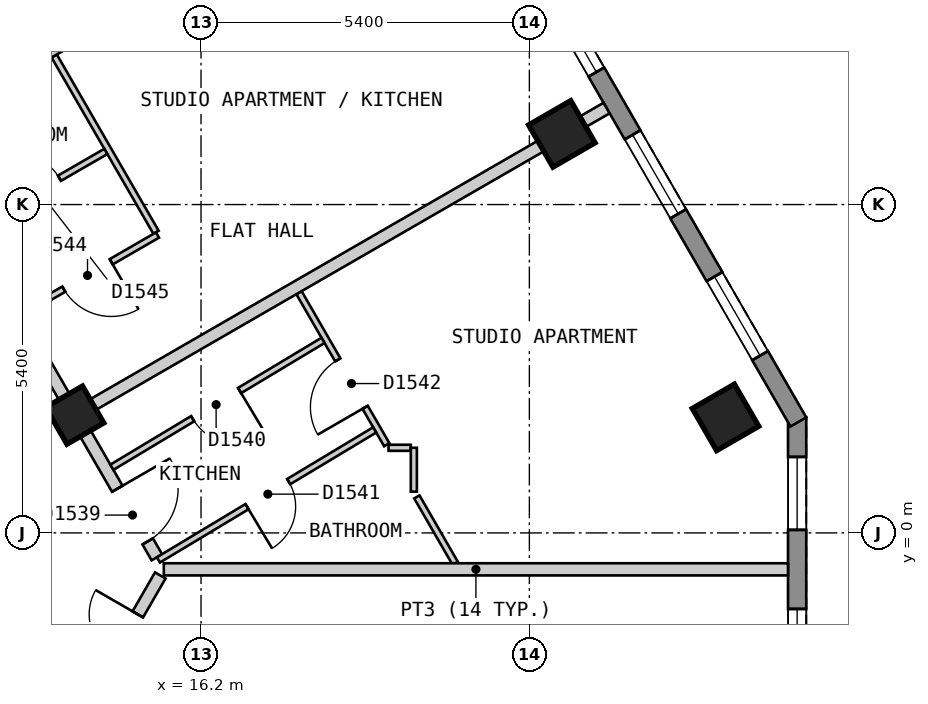
"""IFC4 building model, lengths in metres.
Left out: names, types, materials, properties, quantities, classifications, styles, units other than length and angle.
Written with IfcOpenShell. Run it as: python <this file> out.ifc"""

import sys

from ifc_helpers import new_model, si_unit, direction, frame, frame_2d, origin, origin_2d, place, context, subcontext, project, spatial, polyline, rectangle, outline, extrude, element, fill, save


model = new_model("IFC4")
c1 = context("Model", 3, precision=1e-05, world=origin(), true_north=direction((0.0, 1.0)))
c2 = subcontext(c1, "Body", "Model", "MODEL_VIEW")
j1 = project(units=[si_unit("LENGTHUNIT", "METRE"), si_unit("PLANEANGLEUNIT", "RADIAN")], contexts=[c1])
p1 = place(None, origin())
s1 = spatial("IfcSite", under=j1, at=p1, CompositionType="ELEMENT")
p2 = place(p1, origin())
s2 = spatial("IfcBuilding", under=s1, at=p2, CompositionType="ELEMENT")
p3 = place(p2, frame((0.0, 0.0, 184.2)))
s3 = spatial("IfcBuildingStorey", under=s2, at=p3, CompositionType="ELEMENT", Elevation=184.2)
for number, where, z_axis, x_axis in (
    (1, (24.826, 1.9, 0.0), (0.0, 0.0, 1.0), (-0.5, 0.866, 0.0)),
    (2, (22.134, 6.562, 0.0), (0.0, 0.0, 1.0), (-0.5, 0.866, 0.0)),
):
    element("IfcColumn", number, at=place(p3, frame(where, z_axis=z_axis, x_axis=x_axis)), inside=s3, PredefinedType="COLUMN", context=c2, shape_type="SweptSolid", body=[
        extrude(rectangle(XDim=0.8, YDim=0.8, at=origin_2d()), origin(), (0.0, 0.0, 1.0), 3.0),
    ])
p4 = place(p3, frame((14.123, 1.937, 0.0), z_axis=(0.0, 0.0, 1.0), x_axis=(-0.5, 0.866025403784, 0.0)))
e3 = element("IfcColumn", 3, at=p4, inside=s3, PredefinedType="COLUMN", context=c2, shape_type="SweptSolid", body=[
    extrude(rectangle(XDim=0.7, YDim=0.7, at=origin_2d()), origin(), (0.0, 0.0, 1.0), 3.0),
])
p5 = place(p3, frame((26.004, -3.1, 0.0), z_axis=(0.0, 0.0, 1.0), x_axis=(0.0, 1.0, 0.0)))
e4 = element("IfcWall", 4, at=p5, inside=s3, PredefinedType="SOLIDWALL", context=c2, shape_type="SweptSolid", body=[
    extrude(outline(polyline([(0.0, -0.15), (5.0, -0.15), (4.92, 0.15), (0.08, 0.15), (0.0, -0.15)])), origin(), (0.0, 0.0, 1.0), 2.7),
])
p6 = place(p5, frame((0.65, 0.0, 0.15)))
e5 = element("IfcOpeningElement", 5, at=p6, cuts=e4, PredefinedType="OPENING", context=c2, shape_type="SweptSolid", body=[
    extrude(rectangle(XDim=1.2, YDim=2.1, at=frame_2d((0.6, 1.05))), frame((0.0, 0.16, 0.0), z_axis=(0.0, -1.0, 0.0), x_axis=(1.0, 0.0, 0.0)), (0.0, 0.0, 1.0), 0.32),
])
p7 = place(p5, frame((3.15, 0.0, 0.15)))
e6 = element("IfcOpeningElement", 6, at=p7, cuts=e4, PredefinedType="OPENING", context=c2, shape_type="SweptSolid", body=[
    extrude(rectangle(XDim=1.2, YDim=2.1, at=frame_2d((0.6, 1.05))), frame((0.0, 0.16, 0.0), z_axis=(0.0, -1.0, 0.0), x_axis=(1.0, 0.0, 0.0)), (0.0, 0.0, 1.0), 0.32),
])
p8 = place(p3, frame((26.024, 1.825, 0.0), z_axis=(0.0, 0.0, 1.0), x_axis=(-0.500010537973, 0.866019319597, 0.0)))
e7 = element("IfcWall", 7, at=p8, inside=s3, PredefinedType="SOLIDWALL", context=c2, shape_type="SweptSolid", body=[
    extrude(outline(polyline([(0.0, -0.15), (22.863, -0.15), (22.783, 0.15), (0.08, 0.15), (0.0, -0.15)])), origin(), (0.0, 0.0, 1.0), 2.7),
])
p9 = place(p8, frame((1.259, 0.0, 0.15)))
e8 = element("IfcOpeningElement", 8, at=p9, cuts=e7, PredefinedType="OPENING", context=c2, shape_type="SweptSolid", body=[
    extrude(rectangle(XDim=1.5, YDim=2.1, at=frame_2d((0.75, 1.05))), frame((0.0, 0.16, 0.0), z_axis=(0.0, -1.0, 0.0), x_axis=(1.0, 0.0, 0.0)), (0.0, 0.0, 1.0), 0.32),
])
p10 = place(p8, frame((3.952, 0.0, 0.15)))
e9 = element("IfcOpeningElement", 9, at=p10, cuts=e7, PredefinedType="OPENING", context=c2, shape_type="SweptSolid", body=[
    extrude(rectangle(XDim=1.5, YDim=2.1, at=frame_2d((0.75, 1.05))), frame((0.0, 0.16, 0.0), z_axis=(0.0, -1.0, 0.0), x_axis=(1.0, 0.0, 0.0)), (0.0, 0.0, 1.0), 0.32),
])
p11 = place(p8, frame((6.644, 0.0, 0.15)))
e10 = element("IfcOpeningElement", 10, at=p11, cuts=e7, PredefinedType="OPENING", context=c2, shape_type="SweptSolid", body=[
    extrude(rectangle(XDim=1.5, YDim=2.1, at=frame_2d((0.75, 1.05))), frame((0.0, 0.16, 0.0), z_axis=(0.0, -1.0, 0.0), x_axis=(1.0, 0.0, 0.0)), (0.0, 0.0, 1.0), 0.32),
])
p12 = place(p8, frame((9.335, 0.0, 0.15)))
e11 = element("IfcOpeningElement", 11, at=p12, cuts=e7, PredefinedType="OPENING", context=c2, shape_type="SweptSolid", body=[
    extrude(rectangle(XDim=1.5, YDim=2.1, at=frame_2d((0.75, 1.05))), frame((0.0, 0.16, 0.0), z_axis=(0.0, -1.0, 0.0), x_axis=(1.0, 0.0, 0.0)), (0.0, 0.0, 1.0), 0.32),
])
p13 = place(p8, frame((12.028, 0.0, 0.15)))
e12 = element("IfcOpeningElement", 12, at=p13, cuts=e7, PredefinedType="OPENING", context=c2, shape_type="SweptSolid", body=[
    extrude(rectangle(XDim=1.5, YDim=2.1, at=frame_2d((0.75, 1.05))), frame((0.0, 0.16, 0.0), z_axis=(0.0, -1.0, 0.0), x_axis=(1.0, 0.0, 0.0)), (0.0, 0.0, 1.0), 0.32),
])
p14 = place(p8, frame((14.72, 0.0, 0.15)))
e13 = element("IfcOpeningElement", 13, at=p14, cuts=e7, PredefinedType="OPENING", context=c2, shape_type="SweptSolid", body=[
    extrude(rectangle(XDim=1.5, YDim=2.1, at=frame_2d((0.75, 1.05))), frame((0.0, 0.16, 0.0), z_axis=(0.0, -1.0, 0.0), x_axis=(1.0, 0.0, 0.0)), (0.0, 0.0, 1.0), 0.32),
])
p15 = place(p8, frame((17.411, 0.0, 0.15)))
e14 = element("IfcOpeningElement", 14, at=p15, cuts=e7, PredefinedType="OPENING", context=c2, shape_type="SweptSolid", body=[
    extrude(rectangle(XDim=1.5, YDim=2.1, at=frame_2d((0.75, 1.05))), frame((0.0, 0.16, 0.0), z_axis=(0.0, -1.0, 0.0), x_axis=(1.0, 0.0, 0.0)), (0.0, 0.0, 1.0), 0.32),
])
p16 = place(p8, frame((20.104, 0.0, 0.15)))
e15 = element("IfcOpeningElement", 15, at=p16, cuts=e7, PredefinedType="OPENING", context=c2, shape_type="SweptSolid", body=[
    extrude(rectangle(XDim=1.5, YDim=2.1, at=frame_2d((0.75, 1.05))), frame((0.0, 0.16, 0.0), z_axis=(0.0, -1.0, 0.0), x_axis=(1.0, 0.0, 0.0)), (0.0, 0.0, 1.0), 0.32),
])
p17 = place(p3, frame((10.739, 7.8, 0.0), z_axis=(0.0, 0.0, 1.0), x_axis=(0.500023726918, -0.866011704609, 0.0)))
e16 = element("IfcWall", 16, at=p17, inside=s3, PredefinedType="PARTITIONING", context=c2, shape_type="SweptSolid", body=[
    extrude(rectangle(XDim=9.47, YDim=0.2, at=frame_2d((4.735, 0.0))), origin(), (0.0, 0.0, 1.0), 2.7),
])
p18 = place(p17, frame((8.168, 0.0, 0.0)))
e17 = element("IfcOpeningElement", 17, at=p18, cuts=e16, PredefinedType="OPENING", context=c2, shape_type="SweptSolid", body=[
    extrude(rectangle(XDim=1.0, YDim=2.1, at=frame_2d((0.5, 1.05))), frame((0.0, 0.11, 0.0), z_axis=(0.0, -1.0, 0.0), x_axis=(1.0, 0.0, 0.0)), (0.0, 0.0, 1.0), 0.22),
])
p19 = place(p17, frame((3.578, 0.0, 0.0)))
e18 = element("IfcOpeningElement", 18, at=p19, cuts=e16, PredefinedType="OPENING", context=c2, shape_type="SweptSolid", body=[
    extrude(rectangle(XDim=1.0, YDim=2.1, at=frame_2d((0.5, 1.05))), frame((0.0, 0.11, 0.0), z_axis=(0.0, -1.0, 0.0), x_axis=(1.0, 0.0, 0.0)), (0.0, 0.0, 1.0), 0.22),
])
p20 = place(p3, frame((14.318, -2.8, 0.0), z_axis=(0.0, 0.0, 1.0), x_axis=(0.49964693309, 0.866229151122, 0.0)))
e19 = element("IfcWall", 19, at=p20, inside=s3, PredefinedType="PARTITIONING", context=c2, shape_type="SweptSolid", body=[
    extrude(rectangle(XDim=2.426, YDim=0.2, at=frame_2d((1.213, 0.0))), origin(), (0.0, 0.0, 1.0), 2.7),
])
p21 = place(p20, frame((0.886, 0.0, 0.0)))
e20 = element("IfcOpeningElement", 20, at=p21, cuts=e19, PredefinedType="OPENING", context=c2, shape_type="SweptSolid", body=[
    extrude(rectangle(XDim=0.8, YDim=2.1, at=frame_2d((0.4, 1.05))), frame((0.0, 0.11, 0.0), z_axis=(0.0, -1.0, 0.0), x_axis=(1.0, 0.0, 0.0)), (0.0, 0.0, 1.0), 0.22),
])
p22 = place(p3, frame((13.785, 7.844, 0.0), z_axis=(0.0, 0.0, 1.0), x_axis=(0.500176784828, -0.865923312955, 0.0)))
e21 = element("IfcWall", 21, at=p22, inside=s3, PredefinedType="PARTITIONING", context=c2, shape_type="SweptSolid", body=[
    extrude(rectangle(XDim=3.349, YDim=0.1, at=frame_2d((1.674, 0.0))), origin(), (0.0, 0.0, 1.0), 2.7),
])
p23 = place(p3, frame((17.811, 3.951, 0.0), z_axis=(0.0, 0.0, 1.0), x_axis=(0.499976149225, -0.866039173598, 0.0)))
e22 = element("IfcWall", 22, at=p23, inside=s3, PredefinedType="PARTITIONING", context=c2, shape_type="SweptSolid", body=[
    extrude(rectangle(XDim=2.888, YDim=0.1, at=frame_2d((1.444, 0.0))), origin(), (0.0, 0.0, 1.0), 2.7),
])
p24 = place(p23, frame((1.276, 0.0, 0.0)))
e23 = element("IfcOpeningElement", 23, at=p24, cuts=e22, PredefinedType="OPENING", context=c2, shape_type="SweptSolid", body=[
    extrude(rectangle(XDim=0.9, YDim=2.1, at=frame_2d((0.45, 1.05))), frame((0.0, 0.06, 0.0), z_axis=(0.0, -1.0, 0.0), x_axis=(1.0, 0.0, 0.0)), (0.0, 0.0, 1.0), 0.12),
])
p25 = place(p3, frame((19.75, 0.592, 0.0), z_axis=(0.0, 0.0, 1.0), x_axis=(0.499974077718, -0.866040369504, 0.0)))
e24 = element("IfcWall", 24, at=p25, inside=s3, PredefinedType="PARTITIONING", context=c2, shape_type="SweptSolid", body=[
    extrude(rectangle(XDim=1.26, YDim=0.1, at=frame_2d((0.63, 0.0))), origin(), (0.0, 0.0, 1.0), 2.7),
])
p26 = place(p3, frame((19.284, 1.4, 0.0), z_axis=(0.0, 0.0, 1.0), x_axis=(1.0, 0.0, 0.0)))
e25 = element("IfcWall", 25, at=p26, inside=s3, PredefinedType="PARTITIONING", context=c2, shape_type="SweptSolid", body=[
    extrude(rectangle(XDim=0.366, YDim=0.1, at=frame_2d((0.183, 0.0))), origin(), (0.0, 0.0, 1.0), 2.7),
])
p27 = place(p3, frame((19.7, 0.679, 0.0), z_axis=(0.0, 0.0, 1.0), x_axis=(0.0, 1.0, 0.0)))
e26 = element("IfcWall", 26, at=p27, inside=s3, PredefinedType="PARTITIONING", context=c2, shape_type="SweptSolid", body=[
    extrude(rectangle(XDim=0.721, YDim=0.1, at=frame_2d((0.36, 0.0))), origin(), (0.0, 0.0, 1.0), 2.7),
])
p28 = place(p3, frame((13.268, 3.619, 0.0), z_axis=(0.0, 0.0, 1.0), x_axis=(0.865902724456, 0.500212426655, 0.0)))
e27 = element("IfcWall", 27, at=p28, inside=s3, PredefinedType="PARTITIONING", context=c2, shape_type="SweptSolid", body=[
    extrude(rectangle(XDim=2.559, YDim=0.1, at=frame_2d((1.28, 0.0))), origin(), (0.0, 0.0, 1.0), 2.7),
])
p29 = place(p28, frame((0.78, 0.0, 0.0)))
e28 = element("IfcOpeningElement", 28, at=p29, cuts=e27, PredefinedType="OPENING", context=c2, shape_type="SweptSolid", body=[
    extrude(rectangle(XDim=0.9, YDim=2.1, at=frame_2d((0.45, 1.05))), frame((0.0, 0.06, 0.0), z_axis=(0.0, -1.0, 0.0), x_axis=(1.0, 0.0, 0.0)), (0.0, 0.0, 1.0), 0.12),
])
p30 = place(p3, frame((12.46, 5.018, 0.0), z_axis=(0.0, 0.0, 1.0), x_axis=(0.866080321209, 0.499904868165, 0.0)))
e29 = element("IfcWall", 29, at=p30, inside=s3, PredefinedType="PARTITIONING", context=c2, shape_type="SweptSolid", body=[
    extrude(rectangle(XDim=2.51, YDim=0.1, at=frame_2d((1.255, 0.0))), origin(), (0.0, 0.0, 1.0), 2.7),
])
p31 = place(p30, frame((0.83, 0.0, 0.0)))
e30 = element("IfcOpeningElement", 30, at=p31, cuts=e29, PredefinedType="OPENING", context=c2, shape_type="SweptSolid", body=[
    extrude(rectangle(XDim=0.8, YDim=2.1, at=frame_2d((0.4, 1.05))), frame((0.0, 0.06, 0.0), z_axis=(0.0, -1.0, 0.0), x_axis=(1.0, 0.0, 0.0)), (0.0, 0.0, 1.0), 0.12),
])
p32 = place(p3, frame((14.734, 1.08, 0.0), z_axis=(0.0, 0.0, 1.0), x_axis=(0.857205608004, 0.514974315482, 0.0)))
e31 = element("IfcWall", 31, at=p32, inside=s3, PredefinedType="PARTITIONING", context=c2, shape_type="SweptSolid", body=[
    extrude(rectangle(XDim=4.051, YDim=0.1, at=frame_2d((2.025, 0.0))), origin(), (0.0, 0.0, 1.0), 2.7),
])
p33 = place(p32, frame((1.55, 0.0, 0.0)))
e32 = element("IfcOpeningElement", 32, at=p33, cuts=e31, PredefinedType="OPENING", context=c2, shape_type="SweptSolid", body=[
    extrude(rectangle(XDim=0.9, YDim=2.1, at=frame_2d((0.45, 1.05))), frame((0.0, 0.06, 0.0), z_axis=(0.0, -1.0, 0.0), x_axis=(1.0, 0.0, 0.0)), (0.0, 0.0, 1.0), 0.12),
])
p34 = place(p3, frame((15.499, -0.444, 0.0), z_axis=(0.0, 0.0, 1.0), x_axis=(0.857061798163, 0.515213619899, 0.0)))
e33 = element("IfcWall", 33, at=p34, inside=s3, PredefinedType="PARTITIONING", context=c2, shape_type="SweptSolid", body=[
    extrude(rectangle(XDim=4.15, YDim=0.1, at=frame_2d((2.075, 0.0))), origin(), (0.0, 0.0, 1.0), 2.7),
])
p35 = place(p34, frame((1.7, 0.0, 0.0)))
e34 = element("IfcOpeningElement", 34, at=p35, cuts=e33, PredefinedType="OPENING", context=c2, shape_type="SweptSolid", body=[
    extrude(rectangle(XDim=0.8, YDim=2.1, at=frame_2d((0.4, 1.05))), frame((0.0, 0.06, 0.0), z_axis=(0.0, -1.0, 0.0), x_axis=(1.0, 0.0, 0.0)), (0.0, 0.0, 1.0), 0.12),
])
p36 = place(p3, frame((15.588, -0.599, 0.0), z_axis=(0.0, 0.0, 1.0), x_axis=(1.0, 0.0, 0.0)))
e35 = element("IfcWall", 35, at=p36, inside=s3, PredefinedType="PARTITIONING", context=c2, shape_type="SweptSolid", body=[
    extrude(rectangle(XDim=10.266, YDim=0.2, at=frame_2d((5.133, 0.0))), origin(), (0.0, 0.0, 1.0), 2.7),
])
p37 = place(p3, frame((14.21, 1.987, 0.0), z_axis=(0.0, 0.0, 1.0), x_axis=(0.866022959057, 0.500004234368, 0.0)))
e36 = element("IfcWall", 36, at=p37, inside=s3, PredefinedType="PARTITIONING", context=c2, shape_type="SweptSolid", body=[
    extrude(rectangle(XDim=10.0, YDim=0.2, at=frame_2d((5.0, 0.0))), origin(), (0.0, 0.0, 1.0), 2.7),
])
p38 = place(p3, frame((11.518, 6.65, 0.0), z_axis=(0.0, 0.0, 1.0), x_axis=(0.866016855193, 0.500014806302, 0.0)))
e37 = element("IfcWall", 37, at=p38, inside=s3, PredefinedType="PARTITIONING", context=c2, shape_type="SweptSolid", body=[
    extrude(rectangle(XDim=10.0, YDim=0.2, at=frame_2d((5.0, 0.0))), origin(), (0.0, 0.0, 1.0), 2.7),
])
p39 = place(p6, origin())
e38 = element("IfcWindow", 38, at=p39, inside=s3, PartitioningType="SINGLE_PANEL", PredefinedType="WINDOW", context=c2, shape_type="SweptSolid", body=[
    extrude(rectangle(XDim=1.2, YDim=2.1, at=frame_2d((0.6, 1.05))), frame((0.0, 0.03, 0.0), z_axis=(0.0, -1.0, 0.0), x_axis=(1.0, 0.0, 0.0)), (0.0, 0.0, 1.0), 0.06),
])
fill(e5, e38)
p40 = place(p7, origin())
e39 = element("IfcWindow", 39, at=p40, inside=s3, PartitioningType="SINGLE_PANEL", PredefinedType="WINDOW", context=c2, shape_type="SweptSolid", body=[
    extrude(rectangle(XDim=1.2, YDim=2.1, at=frame_2d((0.6, 1.05))), frame((0.0, 0.03, 0.0), z_axis=(0.0, -1.0, 0.0), x_axis=(1.0, 0.0, 0.0)), (0.0, 0.0, 1.0), 0.06),
])
fill(e6, e39)
p41 = place(p9, origin())
e40 = element("IfcWindow", 40, at=p41, inside=s3, PartitioningType="SINGLE_PANEL", PredefinedType="WINDOW", context=c2, shape_type="SweptSolid", body=[
    extrude(rectangle(XDim=1.5, YDim=2.1, at=frame_2d((0.75, 1.05))), frame((0.0, 0.03, 0.0), z_axis=(0.0, -1.0, 0.0), x_axis=(1.0, 0.0, 0.0)), (0.0, 0.0, 1.0), 0.06),
])
fill(e8, e40)
p42 = place(p10, origin())
e41 = element("IfcWindow", 41, at=p42, inside=s3, PartitioningType="SINGLE_PANEL", PredefinedType="WINDOW", context=c2, shape_type="SweptSolid", body=[
    extrude(rectangle(XDim=1.5, YDim=2.1, at=frame_2d((0.75, 1.05))), frame((0.0, 0.03, 0.0), z_axis=(0.0, -1.0, 0.0), x_axis=(1.0, 0.0, 0.0)), (0.0, 0.0, 1.0), 0.06),
])
fill(e9, e41)
p43 = place(p11, origin())
e42 = element("IfcWindow", 42, at=p43, inside=s3, PartitioningType="SINGLE_PANEL", PredefinedType="WINDOW", context=c2, shape_type="SweptSolid", body=[
    extrude(rectangle(XDim=1.5, YDim=2.1, at=frame_2d((0.75, 1.05))), frame((0.0, 0.03, 0.0), z_axis=(0.0, -1.0, 0.0), x_axis=(1.0, 0.0, 0.0)), (0.0, 0.0, 1.0), 0.06),
])
fill(e10, e42)
p44 = place(p21, origin())
e43 = element("IfcDoor", 43, at=p44, inside=s3, OperationType="SINGLE_SWING_RIGHT", PredefinedType="DOOR", context=c2, shape_type="SweptSolid", body=[
    extrude(rectangle(XDim=0.8, YDim=2.1, at=frame_2d((0.4, 1.05))), frame((0.0, 0.025, 0.0), z_axis=(0.0, -1.0, 0.0), x_axis=(1.0, 0.0, 0.0)), (0.0, 0.0, 1.0), 0.05),
])
fill(e20, e43)
p45 = place(p18, origin())
e44 = element("IfcDoor", 44, at=p45, inside=s3, OperationType="SINGLE_SWING_LEFT", PredefinedType="DOOR", context=c2, shape_type="SweptSolid", body=[
    extrude(rectangle(XDim=1.0, YDim=2.1, at=frame_2d((0.5, 1.05))), frame((0.0, 0.025, 0.0), z_axis=(0.0, -1.0, 0.0), x_axis=(1.0, 0.0, 0.0)), (0.0, 0.0, 1.0), 0.05),
])
fill(e17, e44)
p46 = place(p33, origin())
e45 = element("IfcDoor", 45, at=p46, inside=s3, OperationType="SINGLE_SWING_RIGHT", PredefinedType="DOOR", context=c2, shape_type="SweptSolid", body=[
    extrude(rectangle(XDim=0.9, YDim=2.1, at=frame_2d((0.45, 1.05))), frame((0.0, 0.025, 0.0), z_axis=(0.0, -1.0, 0.0), x_axis=(1.0, 0.0, 0.0)), (0.0, 0.0, 1.0), 0.05),
])
fill(e32, e45)
p47 = place(p35, origin())
e46 = element("IfcDoor", 46, at=p47, inside=s3, OperationType="SINGLE_SWING_LEFT", PredefinedType="DOOR", context=c2, shape_type="SweptSolid", body=[
    extrude(rectangle(XDim=0.8, YDim=2.1, at=frame_2d((0.4, 1.05))), frame((0.0, 0.025, 0.0), z_axis=(0.0, -1.0, 0.0), x_axis=(1.0, 0.0, 0.0)), (0.0, 0.0, 1.0), 0.05),
])
fill(e34, e46)
p48 = place(p24, origin())
e47 = element("IfcDoor", 47, at=p48, inside=s3, OperationType="SINGLE_SWING_RIGHT", PredefinedType="DOOR", context=c2, shape_type="SweptSolid", body=[
    extrude(rectangle(XDim=0.9, YDim=2.1, at=frame_2d((0.45, 1.05))), frame((0.0, 0.025, 0.0), z_axis=(0.0, -1.0, 0.0), x_axis=(1.0, 0.0, 0.0)), (0.0, 0.0, 1.0), 0.05),
])
fill(e23, e47)
p49 = place(p29, origin())
e48 = element("IfcDoor", 48, at=p49, inside=s3, OperationType="SINGLE_SWING_RIGHT", PredefinedType="DOOR", context=c2, shape_type="SweptSolid", body=[
    extrude(rectangle(XDim=0.9, YDim=2.1, at=frame_2d((0.45, 1.05))), frame((0.0, 0.025, 0.0), z_axis=(0.0, -1.0, 0.0), x_axis=(1.0, 0.0, 0.0)), (0.0, 0.0, 1.0), 0.05),
])
fill(e28, e48)
p50 = place(p31, origin())
e49 = element("IfcDoor", 49, at=p50, inside=s3, OperationType="SINGLE_SWING_LEFT", PredefinedType="DOOR", context=c2, shape_type="SweptSolid", body=[
    extrude(rectangle(XDim=0.8, YDim=2.1, at=frame_2d((0.4, 1.05))), frame((0.0, 0.025, 0.0), z_axis=(0.0, -1.0, 0.0), x_axis=(1.0, 0.0, 0.0)), (0.0, 0.0, 1.0), 0.05),
])
fill(e30, e49)
save(model, sys.argv[1])
